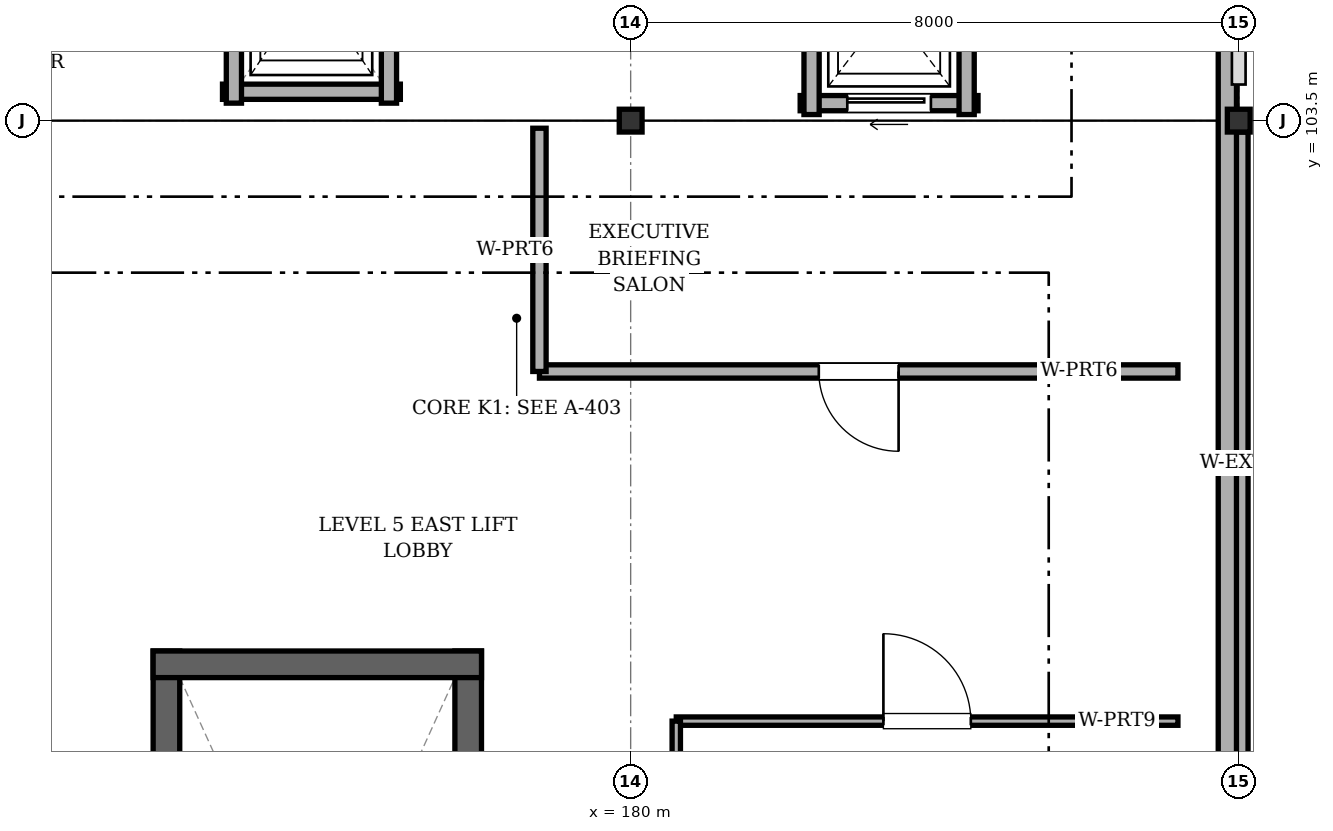
"""IFC4 building model, lengths in metres.
Left out: names, types, materials, properties, quantities, classifications, styles, units other than length and angle.
Written with IfcOpenShell. Run it as: python <this file> out.ifc"""

import sys

from ifc_helpers import new_model, si_unit, direction, frame, frame_2d, origin, origin_2d, place, context, subcontext, project, spatial, rectangle, i_section, extrude, element, fill, save


model = new_model("IFC4")
c1 = context("Model", 3, precision=1e-05, world=origin(), true_north=direction((0.0, 1.0)))
c2 = subcontext(c1, "Body", "Model", "MODEL_VIEW")
j1 = project(units=[si_unit("LENGTHUNIT", "METRE"), si_unit("PLANEANGLEUNIT", "RADIAN")], contexts=[c1])
p1 = place(None, origin())
s1 = spatial("IfcSite", under=j1, at=p1, CompositionType="ELEMENT")
p2 = place(p1, origin())
s2 = spatial("IfcBuilding", under=s1, at=p2, CompositionType="ELEMENT")
p3 = place(p2, frame((0.0, 0.0, 20.8)))
s3 = spatial("IfcBuildingStorey", under=s2, at=p3, CompositionType="ELEMENT", Elevation=20.8)
for number, where, z_axis, x_axis in (
    (1, (180.0, 103.5, 0.0), (0.0, 0.0, 1.0), (1.0, 0.0, 0.0)),
    (2, (188.0, 103.5, 0.0), (0.0, 0.0, 1.0), (1.0, 0.0, 0.0)),
):
    element("IfcColumn", number, at=place(p3, frame(where, z_axis=z_axis, x_axis=x_axis)), inside=s3, PredefinedType="COLUMN", context=c2, shape_type="SweptSolid", body=[
        extrude(i_section(OverallWidth=0.3, OverallDepth=0.3, WebThickness=0.01, FlangeThickness=0.015, FilletRadius=0.018, at=origin_2d()), origin(), (0.0, 0.0, 1.0), 2.85),
    ])
p4 = place(p3, frame((188.0, 103.35, 0.0), z_axis=(0.0, 0.0, 1.0), x_axis=(0.0, -1.0, 0.0)))
e3 = element("IfcWall", 3, at=p4, inside=s3, PredefinedType="SOLIDWALL", context=c2, shape_type="SweptSolid", body=[
    extrude(rectangle(XDim=8.7, YDim=0.245, at=frame_2d((4.35, 0.0))), origin(), (0.0, 0.0, 1.0), 2.18),
])
p5 = place(p3, frame((187.85, 76.65, 2.85), z_axis=(0.0, 0.0, 1.0), x_axis=(0.0, 1.0, 0.0)))
e4 = element("IfcWall", 4, at=p5, inside=s3, PredefinedType="PARAPET", context=c2, shape_type="SweptSolid", body=[
    extrude(rectangle(XDim=49.2, YDim=0.24, at=frame_2d((24.6, 0.0))), origin(), (0.0, 0.0, 1.0), 0.34),
])
for number, where, z_axis, x_axis in (
    (5, (177.863, 86.025, 0.0), (0.0, 0.0, 1.0), (0.0, 1.0, 0.0)),
    (6, (173.893, 96.522, 0.0), (0.0, 0.0, 1.0), (0.0, -1.0, 0.0)),
):
    element("IfcWall", number, at=place(p3, frame(where, z_axis=z_axis, x_axis=x_axis)), inside=s3, PredefinedType="SHEAR", context=c2, shape_type="SweptSolid", body=[
        extrude(rectangle(XDim=10.498, YDim=0.35, at=frame_2d((5.249, 0.0))), origin(), (0.0, 0.0, 1.0), 2.645),
    ])
p6 = place(p3, frame((178.038, 96.347, 0.0), z_axis=(0.0, 0.0, 1.0), x_axis=(-1.0, 0.0, 0.0)))
e7 = element("IfcWall", 7, at=p6, inside=s3, PredefinedType="SHEAR", context=c2, shape_type="SweptSolid", body=[
    extrude(rectangle(XDim=4.32, YDim=0.35, at=frame_2d((2.16, 0.0))), origin(), (0.0, 0.0, 1.0), 2.645),
])
p7 = place(p3, frame((174.63, 103.88, 0.0), z_axis=(0.0, 0.0, 1.0), x_axis=(1.0, 0.0, 0.0)))
e8 = element("IfcWall", 8, at=p7, inside=s3, PredefinedType="SOLIDWALL", context=c2, shape_type="SweptSolid", body=[
    extrude(rectangle(XDim=2.34, YDim=0.2, at=frame_2d((1.17, 0.0))), origin(), (0.0, 0.0, 1.0), 2.23),
])
for number, where, z_axis, x_axis in (
    (9, (174.78, 106.87, 0.0), (0.0, 0.0, 1.0), (0.0, -1.0, 0.0)),
    (10, (176.82, 103.73, 0.0), (0.0, 0.0, 1.0), (0.0, 1.0, 0.0)),
):
    element("IfcWall", number, at=place(p3, frame(where, z_axis=z_axis, x_axis=x_axis)), inside=s3, PredefinedType="SOLIDWALL", context=c2, shape_type="SweptSolid", body=[
        extrude(rectangle(XDim=3.14, YDim=0.2, at=frame_2d((1.57, 0.0))), origin(), (0.0, 0.0, 1.0), 2.23),
    ])
p8 = place(p3, frame((182.23, 103.73, 0.0), z_axis=(0.0, 0.0, 1.0), x_axis=(1.0, 0.0, 0.0)))
e11 = element("IfcWall", 11, at=p8, inside=s3, PredefinedType="SOLIDWALL", context=c2, shape_type="SweptSolid", body=[
    extrude(rectangle(XDim=2.34, YDim=0.2, at=frame_2d((1.17, 0.0))), origin(), (0.0, 0.0, 1.0), 2.23),
])
p9 = place(p8, frame((0.62, 0.0, 0.0)))
e12 = element("IfcOpeningElement", 12, at=p9, cuts=e11, PredefinedType="OPENING", context=c2, shape_type="SweptSolid", body=[
    extrude(rectangle(XDim=1.1, YDim=2.15, at=frame_2d((0.55, 1.075))), frame((0.0, 0.11, 0.0), z_axis=(0.0, -1.0, 0.0), x_axis=(1.0, 0.0, 0.0)), (0.0, 0.0, 1.0), 0.22),
])
for number, where, z_axis, x_axis in (
    (13, (182.38, 106.42, 0.0), (0.0, 0.0, 1.0), (0.0, -1.0, 0.0)),
    (14, (184.42, 103.58, 0.0), (0.0, 0.0, 1.0), (0.0, 1.0, 0.0)),
):
    element("IfcWall", number, at=place(p3, frame(where, z_axis=z_axis, x_axis=x_axis)), inside=s3, PredefinedType="SOLIDWALL", context=c2, shape_type="SweptSolid", body=[
        extrude(rectangle(XDim=2.84, YDim=0.2, at=frame_2d((1.42, 0.0))), origin(), (0.0, 0.0, 1.0), 2.23),
    ])
p10 = place(p3, frame((187.2, 100.2, 0.0), z_axis=(0.0, 0.0, 1.0), x_axis=(-1.0, 0.0, 0.0)))
e15 = element("IfcWall", 15, at=p10, inside=s3, PredefinedType="PARTITIONING", context=c2, shape_type="SweptSolid", body=[
    extrude(rectangle(XDim=8.4, YDim=0.175, at=frame_2d((4.2, 0.0))), origin(), (0.0, 0.0, 1.0), 2.23),
])
p11 = place(p10, frame((3.675, 0.0, 0.0)))
e16 = element("IfcOpeningElement", 16, at=p11, cuts=e15, PredefinedType="OPENING", context=c2, shape_type="SweptSolid", body=[
    extrude(rectangle(XDim=1.05, YDim=2.1, at=frame_2d((0.525, 1.05))), frame((0.0, 0.097, 0.0), z_axis=(0.0, -1.0, 0.0), x_axis=(1.0, 0.0, 0.0)), (0.0, 0.0, 1.0), 0.195),
])
p12 = place(p3, frame((178.8, 100.2, 0.0), z_axis=(0.0, 0.0, 1.0), x_axis=(0.0, 1.0, 0.0)))
e17 = element("IfcWall", 17, at=p12, inside=s3, PredefinedType="PARTITIONING", context=c2, shape_type="SweptSolid", body=[
    extrude(rectangle(XDim=3.2, YDim=0.175, at=frame_2d((1.6, 0.0))), origin(), (0.0, 0.0, 1.0), 2.23),
])
p13 = place(p3, frame((180.6, 95.6, 0.0), z_axis=(0.0, 0.0, 1.0), x_axis=(1.0, 0.0, 0.0)))
e18 = element("IfcWall", 18, at=p13, inside=s3, PredefinedType="PARTITIONING", context=c2, shape_type="SweptSolid", body=[
    extrude(rectangle(XDim=6.6, YDim=0.11, at=frame_2d((3.3, 0.0))), origin(), (0.0, 0.0, 1.0), 2.23),
])
p14 = place(p13, frame((2.725, 0.0, 0.0)))
e19 = element("IfcOpeningElement", 19, at=p14, cuts=e18, PredefinedType="OPENING", context=c2, shape_type="SweptSolid", body=[
    extrude(rectangle(XDim=1.15, YDim=2.1, at=frame_2d((0.575, 1.05))), frame((0.0, 0.065, 0.0), z_axis=(0.0, -1.0, 0.0), x_axis=(1.0, 0.0, 0.0)), (0.0, 0.0, 1.0), 0.13),
])
p15 = place(p3, frame((180.6, 86.4, 0.0), z_axis=(0.0, 0.0, 1.0), x_axis=(0.0, 1.0, 0.0)))
e20 = element("IfcWall", 20, at=p15, inside=s3, PredefinedType="PARTITIONING", context=c2, shape_type="SweptSolid", body=[
    extrude(rectangle(XDim=9.2, YDim=0.11, at=frame_2d((4.6, 0.0))), origin(), (0.0, 0.0, 1.0), 2.23),
])
p16 = place(p9, origin())
e21 = element("IfcDoor", 21, at=p16, inside=s3, OperationType="SLIDING_TO_LEFT", PredefinedType="DOOR", context=c2, shape_type="SweptSolid", body=[
    extrude(rectangle(XDim=1.1, YDim=2.15, at=frame_2d((0.55, 1.075))), frame((0.0, 0.025, 0.0), z_axis=(0.0, -1.0, 0.0), x_axis=(1.0, 0.0, 0.0)), (0.0, 0.0, 1.0), 0.05),
])
fill(e12, e21)
p17 = place(p11, origin())
e22 = element("IfcDoor", 22, at=p17, inside=s3, OperationType="SINGLE_SWING_LEFT", PredefinedType="DOOR", context=c2, shape_type="SweptSolid", body=[
    extrude(rectangle(XDim=1.05, YDim=2.1, at=frame_2d((0.525, 1.05))), frame((0.0, 0.025, 0.0), z_axis=(0.0, -1.0, 0.0), x_axis=(1.0, 0.0, 0.0)), (0.0, 0.0, 1.0), 0.05),
])
fill(e16, e22)
p18 = place(p14, origin())
e23 = element("IfcDoor", 23, at=p18, inside=s3, OperationType="SINGLE_SWING_LEFT", PredefinedType="DOOR", context=c2, shape_type="SweptSolid", body=[
    extrude(rectangle(XDim=1.15, YDim=2.1, at=frame_2d((0.575, 1.05))), frame((0.0, 0.025, 0.0), z_axis=(0.0, -1.0, 0.0), x_axis=(1.0, 0.0, 0.0)), (0.0, 0.0, 1.0), 0.05),
])
fill(e19, e23)
save(model, sys.argv[1])
